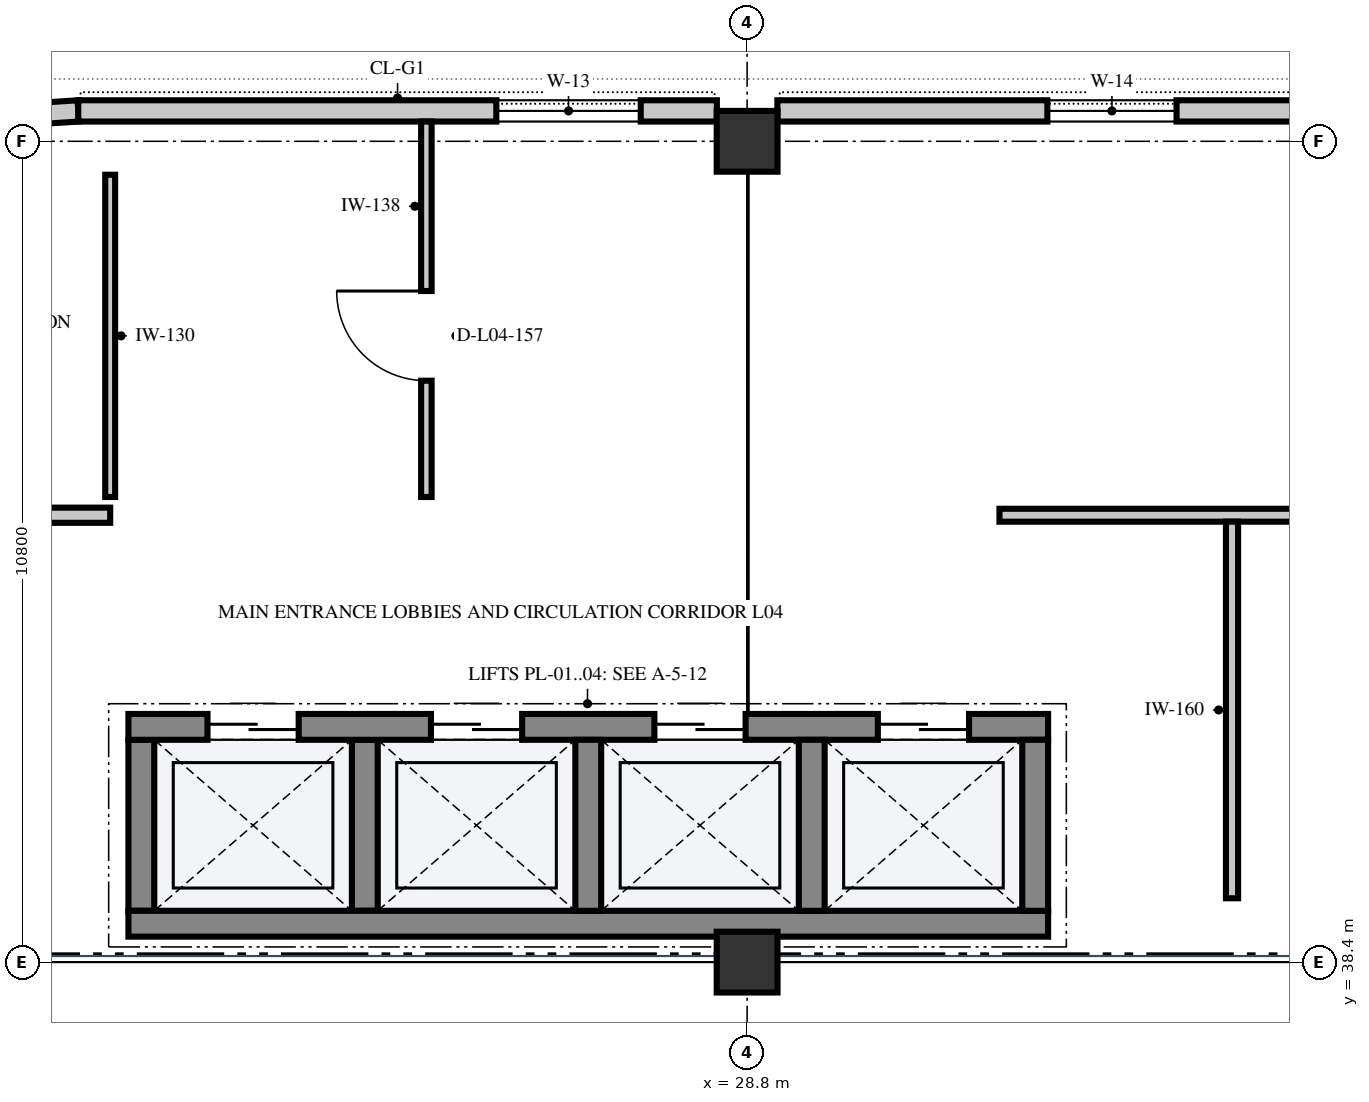
"""IFC4 building model, lengths in metres.
Left out: names, types, materials, properties, quantities, classifications, styles, units other than length and angle.
Written with IfcOpenShell. Run it as: python <this file> out.ifc"""

import sys

from ifc_helpers import new_model, si_unit, direction, frame, frame_2d, origin, origin_2d, place, context, subcontext, project, spatial, rectangle, extrude, element, fill, save


model = new_model("IFC4")
c1 = context("Model", 3, precision=1e-05, world=origin(), true_north=direction((0.0, 1.0)))
c2 = subcontext(c1, "Body", "Model", "MODEL_VIEW")
j1 = project(units=[si_unit("LENGTHUNIT", "METRE"), si_unit("PLANEANGLEUNIT", "RADIAN")], contexts=[c1])
p1 = place(None, origin())
s1 = spatial("IfcSite", under=j1, at=p1, CompositionType="ELEMENT")
p2 = place(p1, origin())
s2 = spatial("IfcBuilding", under=s1, at=p2, CompositionType="ELEMENT")
p3 = place(p2, frame((0.0, 0.0, 19.8)))
s3 = spatial("IfcBuildingStorey", under=s2, at=p3, CompositionType="ELEMENT", Elevation=19.8)
for number, where, z_axis, x_axis in (
    (1, (28.8, 38.4, 0.0), (0.0, 0.0, 1.0), (1.0, 0.0, 0.0)),
    (2, (28.8, 49.2, 0.0), (0.0, 0.0, 1.0), (1.0, 0.0, 0.0)),
):
    element("IfcColumn", number, at=place(p3, frame(where, z_axis=z_axis, x_axis=x_axis)), inside=s3, PredefinedType="COLUMN", context=c2, shape_type="SweptSolid", body=[
        extrude(rectangle(XDim=0.8, YDim=0.8, at=origin_2d()), origin(), (0.0, 0.0, 1.0), 4.8),
    ])
p4 = place(p3, frame((18.042, 49.472, 0.0), z_axis=(0.0, 0.0, 1.0), x_axis=(0.997856149912, 0.065445428286, 0.0)))
e3 = element("IfcWall", 3, at=p4, inside=s3, PredefinedType="SOLIDWALL", context=c2, shape_type="SweptSolid", body=[
    extrude(rectangle(XDim=1.962, YDim=0.28, at=frame_2d((0.981, 0.0))), origin(), (0.0, 0.0, 1.0), 3.42),
])
p5 = place(p3, frame((20.0, 49.6, 0.0), z_axis=(0.0, 0.0, 1.0), x_axis=(1.0, 0.0, 0.0)))
e4 = element("IfcWall", 4, at=p5, inside=s3, PredefinedType="SOLIDWALL", context=c2, shape_type="SweptSolid", body=[
    extrude(rectangle(XDim=8.402, YDim=0.28, at=frame_2d((4.201, 0.0))), origin(), (0.0, 0.0, 1.0), 3.42),
])
p6 = place(p5, frame((5.5, 0.0, 1.1)))
e5 = element("IfcOpeningElement", 5, at=p6, cuts=e4, PredefinedType="OPENING", context=c2, shape_type="SweptSolid", body=[
    extrude(rectangle(XDim=1.9, YDim=1.85, at=frame_2d((0.95, 0.925))), frame((0.0, 0.152, 0.0), z_axis=(0.0, -1.0, 0.0), x_axis=(1.0, 0.0, 0.0)), (0.0, 0.0, 1.0), 0.304),
])
p7 = place(p3, frame((29.198, 49.6, 0.0), z_axis=(0.0, 0.0, 1.0), x_axis=(1.0, 0.0, 0.0)))
e6 = element("IfcWall", 6, at=p7, inside=s3, PredefinedType="SOLIDWALL", context=c2, shape_type="SweptSolid", body=[
    extrude(rectangle(XDim=8.804, YDim=0.28, at=frame_2d((4.402, 0.0))), origin(), (0.0, 0.0, 1.0), 3.42),
])
p8 = place(p7, frame((3.552, 0.0, 1.1)))
e7 = element("IfcOpeningElement", 7, at=p8, cuts=e6, PredefinedType="OPENING", context=c2, shape_type="SweptSolid", body=[
    extrude(rectangle(XDim=1.7, YDim=1.8, at=frame_2d((0.85, 0.9))), frame((0.0, 0.152, 0.0), z_axis=(0.0, -1.0, 0.0), x_axis=(1.0, 0.0, 0.0)), (0.0, 0.0, 1.0), 0.304),
])
for number, where, z_axis, x_axis in (
    (8, (23.77, 39.075, 0.0), (0.0, 0.0, 1.0), (0.0, 1.0, 0.0)),
    (9, (20.83, 39.075, 0.0), (0.0, 0.0, 1.0), (0.0, 1.0, 0.0)),
):
    element("IfcWall", number, at=place(p3, frame(where, z_axis=z_axis, x_axis=x_axis)), inside=s3, PredefinedType="SHEAR", context=c2, shape_type="SweptSolid", body=[
        extrude(rectangle(XDim=2.25, YDim=0.34, at=frame_2d((1.125, 0.0))), origin(), (0.0, 0.0, 1.0), 4.48),
    ])
p9 = place(p3, frame((20.66, 38.905, 0.0), z_axis=(0.0, 0.0, 1.0), x_axis=(1.0, 0.0, 0.0)))
e10 = element("IfcWall", 10, at=p9, inside=s3, PredefinedType="SHEAR", context=c2, shape_type="SweptSolid", body=[
    extrude(rectangle(XDim=12.1, YDim=0.34, at=frame_2d((6.05, 0.0))), origin(), (0.0, 0.0, 1.0), 4.48),
])
p10 = place(p3, frame((20.66, 41.495, 0.0), z_axis=(0.0, 0.0, 1.0), x_axis=(1.0, 0.0, 0.0)))
e11 = element("IfcWall", 11, at=p10, inside=s3, PredefinedType="SHEAR", context=c2, shape_type="SweptSolid", body=[
    extrude(rectangle(XDim=12.1, YDim=0.34, at=frame_2d((6.05, 0.0))), origin(), (0.0, 0.0, 1.0), 4.48),
])
p11 = place(p10, frame((1.04, 0.0, 0.0)))
e12 = element("IfcOpeningElement", 12, at=p11, cuts=e11, PredefinedType="OPENING", context=c2, shape_type="SweptSolid", body=[
    extrude(rectangle(XDim=1.2, YDim=2.2, at=frame_2d((0.6, 1.1))), frame((0.0, 0.182, 0.0), z_axis=(0.0, -1.0, 0.0), x_axis=(1.0, 0.0, 0.0)), (0.0, 0.0, 1.0), 0.364),
])
p12 = place(p10, frame((3.98, 0.0, 0.0)))
e13 = element("IfcOpeningElement", 13, at=p12, cuts=e11, PredefinedType="OPENING", context=c2, shape_type="SweptSolid", body=[
    extrude(rectangle(XDim=1.2, YDim=2.2, at=frame_2d((0.6, 1.1))), frame((0.0, 0.182, 0.0), z_axis=(0.0, -1.0, 0.0), x_axis=(1.0, 0.0, 0.0)), (0.0, 0.0, 1.0), 0.364),
])
p13 = place(p10, frame((6.92, 0.0, 0.0)))
e14 = element("IfcOpeningElement", 14, at=p13, cuts=e11, PredefinedType="OPENING", context=c2, shape_type="SweptSolid", body=[
    extrude(rectangle(XDim=1.2, YDim=2.2, at=frame_2d((0.6, 1.1))), frame((0.0, 0.182, 0.0), z_axis=(0.0, -1.0, 0.0), x_axis=(1.0, 0.0, 0.0)), (0.0, 0.0, 1.0), 0.364),
])
p14 = place(p10, frame((9.86, 0.0, 0.0)))
e15 = element("IfcOpeningElement", 15, at=p14, cuts=e11, PredefinedType="OPENING", context=c2, shape_type="SweptSolid", body=[
    extrude(rectangle(XDim=1.2, YDim=2.2, at=frame_2d((0.6, 1.1))), frame((0.0, 0.182, 0.0), z_axis=(0.0, -1.0, 0.0), x_axis=(1.0, 0.0, 0.0)), (0.0, 0.0, 1.0), 0.364),
])
for number, where, z_axis, x_axis in (
    (16, (26.71, 39.075, 0.0), (0.0, 0.0, 1.0), (0.0, 1.0, 0.0)),
    (17, (29.65, 39.075, 0.0), (0.0, 0.0, 1.0), (0.0, 1.0, 0.0)),
    (18, (32.59, 39.075, 0.0), (0.0, 0.0, 1.0), (0.0, 1.0, 0.0)),
):
    element("IfcWall", number, at=place(p3, frame(where, z_axis=z_axis, x_axis=x_axis)), inside=s3, PredefinedType="SHEAR", context=c2, shape_type="SweptSolid", body=[
        extrude(rectangle(XDim=2.25, YDim=0.34, at=frame_2d((1.125, 0.0))), origin(), (0.0, 0.0, 1.0), 4.48),
    ])
p15 = place(p3, frame((9.033, 44.28, 0.0), z_axis=(0.0, 0.0, 1.0), x_axis=(1.0, 0.0, 0.0)))
e19 = element("IfcWall", 19, at=p15, inside=s3, PredefinedType="PARTITIONING", context=c2, shape_type="SweptSolid", body=[
    extrude(rectangle(XDim=11.387, YDim=0.2, at=frame_2d((5.693, 0.0))), origin(), (0.0, 0.0, 1.0), 3.42),
])
p16 = place(p15, frame((5.233, 0.0, 0.0)))
e20 = element("IfcOpeningElement", 20, at=p16, cuts=e19, PredefinedType="OPENING", context=c2, shape_type="SweptSolid", body=[
    extrude(rectangle(XDim=0.92, YDim=2.1, at=frame_2d((0.46, 1.05))), frame((0.0, 0.112, 0.0), z_axis=(0.0, -1.0, 0.0), x_axis=(1.0, 0.0, 0.0)), (0.0, 0.0, 1.0), 0.224),
])
p17 = place(p3, frame((32.12, 44.28, 0.0), z_axis=(0.0, 0.0, 1.0), x_axis=(1.0, 0.0, 0.0)))
e21 = element("IfcWall", 21, at=p17, inside=s3, PredefinedType="PARTITIONING", context=c2, shape_type="SweptSolid", body=[
    extrude(rectangle(XDim=25.14, YDim=0.17, at=frame_2d((12.57, 0.0))), origin(), (0.0, 0.0, 1.0), 3.42),
])
p18 = place(p17, frame((12.11, 0.0, 0.0)))
e22 = element("IfcOpeningElement", 22, at=p18, cuts=e21, PredefinedType="OPENING", context=c2, shape_type="SweptSolid", body=[
    extrude(rectangle(XDim=0.92, YDim=2.1, at=frame_2d((0.46, 1.05))), frame((0.0, 0.097, 0.0), z_axis=(0.0, -1.0, 0.0), x_axis=(1.0, 0.0, 0.0)), (0.0, 0.0, 1.0), 0.194),
])
p19 = place(p3, frame((35.18, 39.24, 0.0), z_axis=(0.0, 0.0, 1.0), x_axis=(0.0, 1.0, 0.0)))
e23 = element("IfcWall", 23, at=p19, inside=s3, PredefinedType="PARTITIONING", context=c2, shape_type="SweptSolid", body=[
    extrude(rectangle(XDim=4.955, YDim=0.16, at=frame_2d((2.478, 0.0))), origin(), (0.0, 0.0, 1.0), 4.48),
])
p20 = place(p3, frame((24.58, 44.52, 0.0), z_axis=(0.0, 0.0, 1.0), x_axis=(0.0, 1.0, 0.0)))
e24 = element("IfcWall", 24, at=p20, inside=s3, PredefinedType="PARTITIONING", context=c2, shape_type="SweptSolid", body=[
    extrude(rectangle(XDim=4.94, YDim=0.138, at=frame_2d((2.47, 0.0))), origin(), (0.0, 0.0, 1.0), 3.42),
])
p21 = place(p20, frame((1.53, 0.0, 0.0)))
e25 = element("IfcOpeningElement", 25, at=p21, cuts=e24, PredefinedType="OPENING", context=c2, shape_type="SweptSolid", body=[
    extrude(rectangle(XDim=1.18, YDim=2.22, at=frame_2d((0.59, 1.11))), frame((0.0, 0.081, 0.0), z_axis=(0.0, -1.0, 0.0), x_axis=(1.0, 0.0, 0.0)), (0.0, 0.0, 1.0), 0.162),
])
p22 = place(p3, frame((20.42, 48.76, 0.0), z_axis=(0.0, 0.0, 1.0), x_axis=(0.0, -1.0, 0.0)))
e26 = element("IfcWall", 26, at=p22, inside=s3, PredefinedType="PARTITIONING", context=c2, shape_type="SweptSolid", body=[
    extrude(rectangle(XDim=4.24, YDim=0.13, at=frame_2d((2.12, 0.0))), origin(), (0.0, 0.0, 1.0), 4.48),
])
p23 = place(p6, origin())
e27 = element("IfcWindow", 27, at=p23, inside=s3, PartitioningType="SINGLE_PANEL", PredefinedType="WINDOW", context=c2, shape_type="SweptSolid", body=[
    extrude(rectangle(XDim=1.9, YDim=1.85, at=frame_2d((0.95, 0.925))), frame((0.0, 0.03, 0.0), z_axis=(0.0, -1.0, 0.0), x_axis=(1.0, 0.0, 0.0)), (0.0, 0.0, 1.0), 0.06),
])
fill(e5, e27)
p24 = place(p8, origin())
e28 = element("IfcWindow", 28, at=p24, inside=s3, PartitioningType="SINGLE_PANEL", PredefinedType="WINDOW", context=c2, shape_type="SweptSolid", body=[
    extrude(rectangle(XDim=1.7, YDim=1.8, at=frame_2d((0.85, 0.9))), frame((0.0, 0.03, 0.0), z_axis=(0.0, -1.0, 0.0), x_axis=(1.0, 0.0, 0.0)), (0.0, 0.0, 1.0), 0.06),
])
fill(e7, e28)
p25 = place(p11, origin())
e29 = element("IfcDoor", 29, at=p25, inside=s3, OperationType="DOUBLE_DOOR_SLIDING", PredefinedType="DOOR", context=c2, shape_type="SweptSolid", body=[
    extrude(rectangle(XDim=1.2, YDim=2.2, at=frame_2d((0.6, 1.1))), frame((0.0, 0.025, 0.0), z_axis=(0.0, -1.0, 0.0), x_axis=(1.0, 0.0, 0.0)), (0.0, 0.0, 1.0), 0.05),
])
fill(e12, e29)
p26 = place(p12, origin())
e30 = element("IfcDoor", 30, at=p26, inside=s3, OperationType="DOUBLE_DOOR_SLIDING", PredefinedType="DOOR", context=c2, shape_type="SweptSolid", body=[
    extrude(rectangle(XDim=1.2, YDim=2.2, at=frame_2d((0.6, 1.1))), frame((0.0, 0.025, 0.0), z_axis=(0.0, -1.0, 0.0), x_axis=(1.0, 0.0, 0.0)), (0.0, 0.0, 1.0), 0.05),
])
fill(e13, e30)
p27 = place(p13, origin())
e31 = element("IfcDoor", 31, at=p27, inside=s3, OperationType="DOUBLE_DOOR_SLIDING", PredefinedType="DOOR", context=c2, shape_type="SweptSolid", body=[
    extrude(rectangle(XDim=1.2, YDim=2.2, at=frame_2d((0.6, 1.1))), frame((0.0, 0.025, 0.0), z_axis=(0.0, -1.0, 0.0), x_axis=(1.0, 0.0, 0.0)), (0.0, 0.0, 1.0), 0.05),
])
fill(e14, e31)
p28 = place(p14, origin())
e32 = element("IfcDoor", 32, at=p28, inside=s3, OperationType="DOUBLE_DOOR_SLIDING", PredefinedType="DOOR", context=c2, shape_type="SweptSolid", body=[
    extrude(rectangle(XDim=1.2, YDim=2.2, at=frame_2d((0.6, 1.1))), frame((0.0, 0.025, 0.0), z_axis=(0.0, -1.0, 0.0), x_axis=(1.0, 0.0, 0.0)), (0.0, 0.0, 1.0), 0.05),
])
fill(e15, e32)
p29 = place(p21, origin())
e33 = element("IfcDoor", 33, at=p29, inside=s3, OperationType="SINGLE_SWING_RIGHT", PredefinedType="DOOR", context=c2, shape_type="SweptSolid", body=[
    extrude(rectangle(XDim=1.18, YDim=2.22, at=frame_2d((0.59, 1.11))), frame((0.0, 0.025, 0.0), z_axis=(0.0, -1.0, 0.0), x_axis=(1.0, 0.0, 0.0)), (0.0, 0.0, 1.0), 0.05),
])
fill(e25, e33)
save(model, sys.argv[1])
